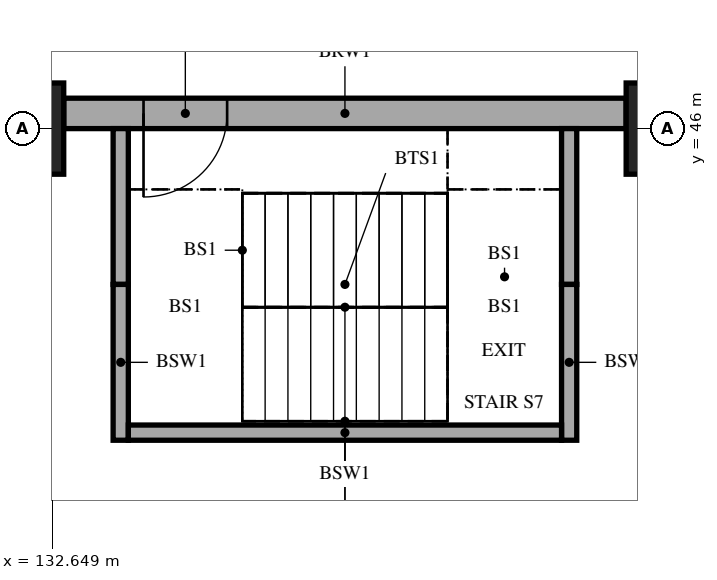
"""IFC4 building model, lengths in metres.
Left out: names, types, materials, properties, quantities, classifications, styles, units other than length and angle.
Written with IfcOpenShell. Run it as: python <this file> out.ifc"""

import sys

from ifc_helpers import new_model, si_unit, direction, frame, frame_2d, origin, origin_2d, place, context, subcontext, project, spatial, rectangle, extrude, element, fill, save


model = new_model("IFC4")
c1 = context("Model", 3, precision=1e-05, world=origin(), true_north=direction((0.0, 1.0)))
c2 = subcontext(c1, "Body", "Model", "MODEL_VIEW")
j1 = project(units=[si_unit("LENGTHUNIT", "METRE"), si_unit("PLANEANGLEUNIT", "RADIAN")], contexts=[c1])
p1 = place(None, origin())
s1 = spatial("IfcSite", under=j1, at=p1, CompositionType="ELEMENT")
p2 = place(p1, origin())
s2 = spatial("IfcBuilding", under=s1, at=p2, CompositionType="ELEMENT")
p3 = place(p2, frame((0.0, 0.0, -8.4)))
s3 = spatial("IfcBuildingStorey", under=s2, at=p3, CompositionType="ELEMENT", Elevation=-8.4)
for number, where, z_axis, x_axis in (
    (1, (132.0, 46.0, 0.0), (0.0, 0.0, 1.0), (1.0, 0.0, 0.0)),
    (2, (141.0, 46.0, 0.0), (0.0, 0.0, 1.0), (1.0, 0.0, 0.0)),
):
    element("IfcColumn", number, at=place(p3, frame(where, z_axis=z_axis, x_axis=x_axis)), inside=s3, PredefinedType="COLUMN", context=c2, shape_type="SweptSolid", body=[
        extrude(rectangle(XDim=1.6, YDim=1.2, at=origin_2d()), origin(), (0.0, 0.0, 1.0), 4.2),
    ])
p4 = place(p3, frame((132.8, 46.2, 0.0), z_axis=(0.0, 0.0, 1.0), x_axis=(1.0, 0.0, 0.0)))
e3 = element("IfcWall", 3, at=p4, inside=s3, PredefinedType="SOLIDWALL", context=c2, shape_type="SweptSolid", body=[
    extrude(rectangle(XDim=7.4, YDim=0.4, at=frame_2d((3.7, 0.0))), origin(), (0.0, 0.0, 1.0), 4.2),
])
p5 = place(p4, frame((1.05, 0.0, 0.0)))
e4 = element("IfcOpeningElement", 4, at=p5, cuts=e3, PredefinedType="OPENING", context=c2, shape_type="SweptSolid", body=[
    extrude(rectangle(XDim=1.1, YDim=2.1, at=frame_2d((0.55, 1.05))), frame((0.0, 0.21, 0.0), z_axis=(0.0, -1.0, 0.0), x_axis=(1.0, 0.0, 0.0)), (0.0, 0.0, 1.0), 0.42),
])
for number, where, z_axis, x_axis in (
    (5, (133.55, 46.0, 0.0), (0.0, 0.0, 1.0), (0.0, -1.0, 0.0)),
    (6, (133.55, 43.95, 0.0), (0.0, 0.0, 1.0), (0.0, -1.0, 0.0)),
    (7, (139.45, 46.0, 0.0), (0.0, 0.0, 1.0), (0.0, -1.0, 0.0)),
    (8, (139.45, 43.95, 0.0), (0.0, 0.0, 1.0), (0.0, -1.0, 0.0)),
):
    element("IfcWall", number, at=place(p3, frame(where, z_axis=z_axis, x_axis=x_axis)), inside=s3, PredefinedType="SOLIDWALL", context=c2, shape_type="SweptSolid", body=[
        extrude(rectangle(XDim=2.05, YDim=0.2, at=frame_2d((1.025, 0.0))), origin(), (0.0, 0.0, 1.0), 4.2),
    ])
p6 = place(p3, frame((133.65, 42.0, 0.0), z_axis=(0.0, 0.0, 1.0), x_axis=(1.0, 0.0, 0.0)))
e9 = element("IfcWall", 9, at=p6, inside=s3, PredefinedType="SOLIDWALL", context=c2, shape_type="SweptSolid", body=[
    extrude(rectangle(XDim=5.7, YDim=0.2, at=frame_2d((2.85, 0.0))), origin(), (0.0, 0.0, 1.0), 4.2),
])
p7 = place(p5, frame((1.1, 0.0, 0.0), z_axis=(0.0, 0.0, 1.0), x_axis=(-1.0, 0.0, 0.0)))
e10 = element("IfcDoor", 10, at=p7, inside=s3, OperationType="SINGLE_SWING_RIGHT", PredefinedType="DOOR", context=c2, shape_type="SweptSolid", body=[
    extrude(rectangle(XDim=1.1, YDim=2.1, at=frame_2d((0.55, 1.05))), frame((0.0, 0.025, 0.0), z_axis=(0.0, -1.0, 0.0), x_axis=(1.0, 0.0, 0.0)), (0.0, 0.0, 1.0), 0.05),
])
fill(e4, e10)
save(model, sys.argv[1])
